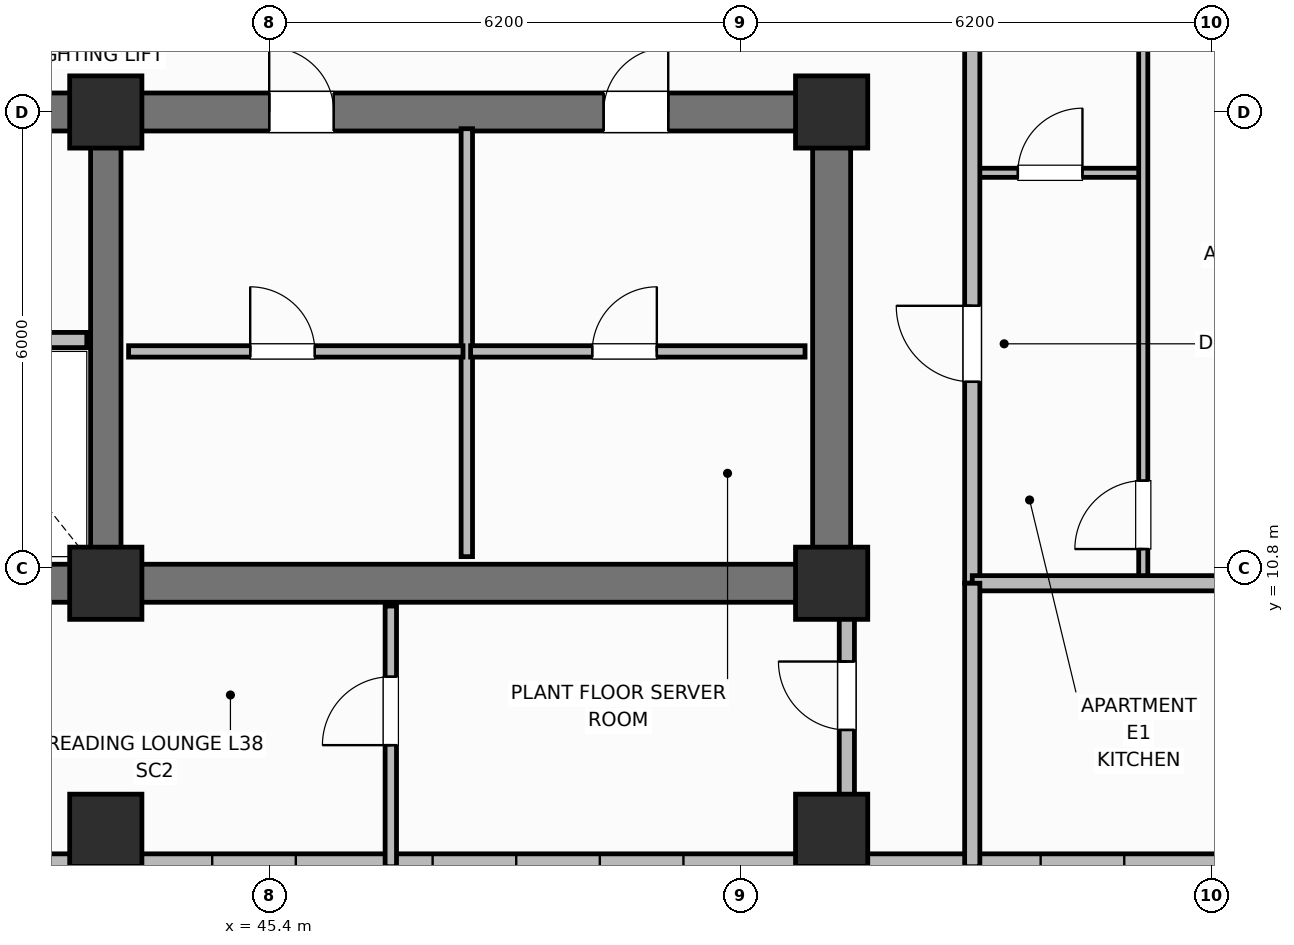
"""IFC4 building model, lengths in metres.
Left out: names, types, materials, properties, quantities, classifications, styles, units other than length and angle.
Written with IfcOpenShell. Run it as: python <this file> out.ifc"""

import sys

from ifc_helpers import new_model, si_unit, direction, frame, frame_2d, origin, origin_2d, place, context, subcontext, project, spatial, rectangle, extrude, element, fill, save


model = new_model("IFC4")
c1 = context("Model", 3, precision=1e-05, world=origin(), true_north=direction((0.0, 1.0)))
c2 = subcontext(c1, "Body", "Model", "MODEL_VIEW")
j1 = project(units=[si_unit("LENGTHUNIT", "METRE"), si_unit("PLANEANGLEUNIT", "RADIAN")], contexts=[c1])
p1 = place(None, origin())
s1 = spatial("IfcSite", under=j1, at=p1, CompositionType="ELEMENT")
p2 = place(p1, origin())
s2 = spatial("IfcBuilding", under=s1, at=p2, CompositionType="ELEMENT")
p3 = place(p2, frame((0.0, 0.0, 155.2)))
s3 = spatial("IfcBuildingStorey", under=s2, at=p3, CompositionType="ELEMENT", Elevation=155.2)
p4 = place(p3, frame((52.8, 10.6, 0.0), z_axis=(0.0, 0.0, 1.0), x_axis=(-1.0, 0.0, 0.0)))
e1 = element("IfcWall", 1, at=p4, inside=s3, PredefinedType="SHEAR", context=c2, shape_type="SweptSolid", body=[
    extrude(rectangle(XDim=27.2, YDim=0.5, at=frame_2d((13.6, 0.0))), origin(), (0.0, 0.0, 1.0), 3.7),
])
p5 = place(p3, frame((52.8, 10.85, 0.0), z_axis=(0.0, 0.0, 1.0), x_axis=(0.0, 1.0, 0.0)))
e2 = element("IfcWall", 2, at=p5, inside=s3, PredefinedType="SHEAR", context=c2, shape_type="SweptSolid", body=[
    extrude(rectangle(XDim=5.7, YDim=0.5, at=frame_2d((2.85, 0.0))), origin(), (0.0, 0.0, 1.0), 3.7),
])
p6 = place(p3, frame((25.6, 16.8, 0.0), z_axis=(0.0, 0.0, 1.0), x_axis=(1.0, 0.0, 0.0)))
e3 = element("IfcWall", 3, at=p6, inside=s3, PredefinedType="SHEAR", context=c2, shape_type="SweptSolid", body=[
    extrude(rectangle(XDim=27.2, YDim=0.5, at=frame_2d((13.6, 0.0))), origin(), (0.0, 0.0, 1.0), 3.7),
])
p7 = place(p6, frame((1.7, 0.0, 0.0)))
e4 = element("IfcOpeningElement", 4, at=p7, cuts=e3, PredefinedType="OPENING", context=c2, shape_type="SweptSolid", body=[
    extrude(rectangle(XDim=1.1, YDim=2.15, at=frame_2d((0.55, 1.075))), frame((0.0, 0.26, 0.0), z_axis=(0.0, -1.0, 0.0), x_axis=(1.0, 0.0, 0.0)), (0.0, 0.0, 1.0), 0.52),
])
p8 = place(p6, frame((4.45, 0.0, 0.0)))
e5 = element("IfcOpeningElement", 5, at=p8, cuts=e3, PredefinedType="OPENING", context=c2, shape_type="SweptSolid", body=[
    extrude(rectangle(XDim=0.85, YDim=2.1, at=frame_2d((0.425, 1.05))), frame((0.0, 0.26, 0.0), z_axis=(0.0, -1.0, 0.0), x_axis=(1.0, 0.0, 0.0)), (0.0, 0.0, 1.0), 0.52),
])
p9 = place(p6, frame((6.5, 0.0, 0.0)))
e6 = element("IfcOpeningElement", 6, at=p9, cuts=e3, PredefinedType="OPENING", context=c2, shape_type="SweptSolid", body=[
    extrude(rectangle(XDim=0.85, YDim=2.1, at=frame_2d((0.425, 1.05))), frame((0.0, 0.26, 0.0), z_axis=(0.0, -1.0, 0.0), x_axis=(1.0, 0.0, 0.0)), (0.0, 0.0, 1.0), 0.52),
])
p10 = place(p6, frame((13.0, 0.0, 0.0)))
e7 = element("IfcOpeningElement", 7, at=p10, cuts=e3, PredefinedType="OPENING", context=c2, shape_type="SweptSolid", body=[
    extrude(rectangle(XDim=1.2, YDim=2.15, at=frame_2d((0.6, 1.075))), frame((0.0, 0.26, 0.0), z_axis=(0.0, -1.0, 0.0), x_axis=(1.0, 0.0, 0.0)), (0.0, 0.0, 1.0), 0.52),
])
p11 = place(p6, frame((19.8, 0.0, 0.0)))
e8 = element("IfcOpeningElement", 8, at=p11, cuts=e3, PredefinedType="OPENING", context=c2, shape_type="SweptSolid", body=[
    extrude(rectangle(XDim=0.85, YDim=2.1, at=frame_2d((0.425, 1.05))), frame((0.0, 0.26, 0.0), z_axis=(0.0, -1.0, 0.0), x_axis=(1.0, 0.0, 0.0)), (0.0, 0.0, 1.0), 0.52),
])
p12 = place(p6, frame((24.2, 0.0, 0.0)))
e9 = element("IfcOpeningElement", 9, at=p12, cuts=e3, PredefinedType="OPENING", context=c2, shape_type="SweptSolid", body=[
    extrude(rectangle(XDim=0.85, YDim=2.1, at=frame_2d((0.425, 1.05))), frame((0.0, 0.26, 0.0), z_axis=(0.0, -1.0, 0.0), x_axis=(1.0, 0.0, 0.0)), (0.0, 0.0, 1.0), 0.52),
])
p13 = place(p3, frame((43.25, 10.85, 0.0), z_axis=(0.0, 0.0, 1.0), x_axis=(0.0, 1.0, 0.0)))
e10 = element("IfcWall", 10, at=p13, inside=s3, PredefinedType="SHEAR", context=c2, shape_type="SweptSolid", body=[
    extrude(rectangle(XDim=5.7, YDim=0.4, at=frame_2d((2.85, 0.0))), origin(), (0.0, 0.0, 1.0), 3.7),
])
for number, where, z_axis, x_axis in (
    (11, (43.25, 10.6, 0.0), (0.0, 0.0, 1.0), (1.0, 0.0, 0.0)),
    (12, (43.25, 16.8, 0.0), (0.0, 0.0, 1.0), (1.0, 0.0, 0.0)),
    (13, (52.8, 10.6, 0.0), (0.0, 0.0, 1.0), (1.0, 0.0, 0.0)),
    (14, (52.8, 16.8, 0.0), (0.0, 0.0, 1.0), (1.0, 0.0, 0.0)),
    (15, (43.25, 7.35, 0.0), (0.0, 0.0, 1.0), (1.0, 0.0, 0.0)),
    (16, (52.8, 7.35, 0.0), (0.0, 0.0, 1.0), (1.0, 0.0, 0.0)),
):
    element("IfcColumn", number, at=place(p3, frame(where, z_axis=z_axis, x_axis=x_axis)), inside=s3, PredefinedType="COLUMN", context=c2, shape_type="SweptSolid", body=[
        extrude(rectangle(XDim=0.95, YDim=0.95, at=origin_2d()), origin(), (0.0, 0.0, 1.0), 3.7),
    ])
p14 = place(p3, frame((42.4, 6.87, 0.0), z_axis=(0.0, 0.0, 1.0), x_axis=(1.0, 0.0, 0.0)))
e17 = element("IfcWall", 17, at=p14, inside=s3, PredefinedType="SOLIDWALL", context=c2, shape_type="SweptSolid", body=[
    extrude(rectangle(XDim=15.8, YDim=0.34, at=frame_2d((7.9, 0.0))), origin(), (0.0, 0.0, 1.0), 2.72),
])
p15 = place(p14, frame((2.25, 0.0, 0.95)))
e18 = element("IfcOpeningElement", 18, at=p15, cuts=e17, PredefinedType="OPENING", context=c2, shape_type="SweptSolid", body=[
    extrude(rectangle(XDim=1.1, YDim=1.65, at=frame_2d((0.55, 0.825))), frame((0.0, 0.18, 0.0), z_axis=(0.0, -1.0, 0.0), x_axis=(1.0, 0.0, 0.0)), (0.0, 0.0, 1.0), 0.36),
])
p16 = place(p14, frame((5.15, 0.0, 0.95)))
e19 = element("IfcOpeningElement", 19, at=p16, cuts=e17, PredefinedType="OPENING", context=c2, shape_type="SweptSolid", body=[
    extrude(rectangle(XDim=1.1, YDim=1.65, at=frame_2d((0.55, 0.825))), frame((0.0, 0.18, 0.0), z_axis=(0.0, -1.0, 0.0), x_axis=(1.0, 0.0, 0.0)), (0.0, 0.0, 1.0), 0.36),
])
p17 = place(p14, frame((7.35, 0.0, 0.95)))
e20 = element("IfcOpeningElement", 20, at=p17, cuts=e17, PredefinedType="OPENING", context=c2, shape_type="SweptSolid", body=[
    extrude(rectangle(XDim=1.1, YDim=1.65, at=frame_2d((0.55, 0.825))), frame((0.0, 0.18, 0.0), z_axis=(0.0, -1.0, 0.0), x_axis=(1.0, 0.0, 0.0)), (0.0, 0.0, 1.0), 0.36),
])
p18 = place(p14, frame((13.15, 0.0, 0.95)))
e21 = element("IfcOpeningElement", 21, at=p18, cuts=e17, PredefinedType="OPENING", context=c2, shape_type="SweptSolid", body=[
    extrude(rectangle(XDim=1.1, YDim=1.65, at=frame_2d((0.55, 0.825))), frame((0.0, 0.18, 0.0), z_axis=(0.0, -1.0, 0.0), x_axis=(1.0, 0.0, 0.0)), (0.0, 0.0, 1.0), 0.36),
])
p19 = place(p3, frame((35.4, 13.8, 0.0), z_axis=(0.0, 0.0, 1.0), x_axis=(1.0, 0.0, 0.0)))
e22 = element("IfcWall", 22, at=p19, inside=s3, PredefinedType="PARTITIONING", context=c2, shape_type="SweptSolid", body=[
    extrude(rectangle(XDim=7.6, YDim=0.2, at=frame_2d((3.8, 0.0))), origin(), (0.0, 0.0, 1.0), 2.32),
])
p20 = place(p19, frame((0.7, 0.0, 0.0)))
e23 = element("IfcOpeningElement", 23, at=p20, cuts=e22, PredefinedType="OPENING", context=c2, shape_type="SweptSolid", body=[
    extrude(rectangle(XDim=1.1, YDim=2.15, at=frame_2d((0.55, 1.075))), frame((0.0, 0.11, 0.0), z_axis=(0.0, -1.0, 0.0), x_axis=(1.0, 0.0, 0.0)), (0.0, 0.0, 1.0), 0.22),
])
p21 = place(p19, frame((3.35, 0.0, 0.0)))
e24 = element("IfcOpeningElement", 24, at=p21, cuts=e22, PredefinedType="OPENING", context=c2, shape_type="SweptSolid", body=[
    extrude(rectangle(XDim=1.2, YDim=2.15, at=frame_2d((0.6, 1.075))), frame((0.0, 0.11, 0.0), z_axis=(0.0, -1.0, 0.0), x_axis=(1.0, 0.0, 0.0)), (0.0, 0.0, 1.0), 0.22),
])
p22 = place(p3, frame((48.0, 10.95, 0.0), z_axis=(0.0, 0.0, 1.0), x_axis=(0.0, 1.0, 0.0)))
e25 = element("IfcWall", 25, at=p22, inside=s3, PredefinedType="PARTITIONING", context=c2, shape_type="SweptSolid", body=[
    extrude(rectangle(XDim=5.63, YDim=0.15, at=frame_2d((2.815, 0.0))), origin(), (0.0, 0.0, 1.0), 2.55),
])
p23 = place(p3, frame((43.55, 13.65, 0.0), z_axis=(0.0, 0.0, 1.0), x_axis=(1.0, 0.0, 0.0)))
e26 = element("IfcWall", 26, at=p23, inside=s3, PredefinedType="PARTITIONING", context=c2, shape_type="SweptSolid", body=[
    extrude(rectangle(XDim=4.4, YDim=0.15, at=frame_2d((2.2, 0.0))), origin(), (0.0, 0.0, 1.0), 2.55),
])
p24 = place(p23, frame((1.6, 0.0, 0.0)))
e27 = element("IfcOpeningElement", 27, at=p24, cuts=e26, PredefinedType="OPENING", context=c2, shape_type="SweptSolid", body=[
    extrude(rectangle(XDim=0.85, YDim=2.1, at=frame_2d((0.425, 1.05))), frame((0.0, 0.085, 0.0), z_axis=(0.0, -1.0, 0.0), x_axis=(1.0, 0.0, 0.0)), (0.0, 0.0, 1.0), 0.17),
])
p25 = place(p3, frame((48.05, 13.65, 0.0), z_axis=(0.0, 0.0, 1.0), x_axis=(1.0, 0.0, 0.0)))
e28 = element("IfcWall", 28, at=p25, inside=s3, PredefinedType="PARTITIONING", context=c2, shape_type="SweptSolid", body=[
    extrude(rectangle(XDim=4.4, YDim=0.15, at=frame_2d((2.2, 0.0))), origin(), (0.0, 0.0, 1.0), 2.55),
])
p26 = place(p25, frame((1.6, 0.0, 0.0)))
e29 = element("IfcOpeningElement", 29, at=p26, cuts=e28, PredefinedType="OPENING", context=c2, shape_type="SweptSolid", body=[
    extrude(rectangle(XDim=0.85, YDim=2.1, at=frame_2d((0.425, 1.05))), frame((0.0, 0.085, 0.0), z_axis=(0.0, -1.0, 0.0), x_axis=(1.0, 0.0, 0.0)), (0.0, 0.0, 1.0), 0.17),
])
p27 = place(p3, frame((54.65, 16.0, 0.0), z_axis=(0.0, 0.0, 1.0), x_axis=(1.0, 0.0, 0.0)))
e30 = element("IfcWall", 30, at=p27, inside=s3, PredefinedType="PARTITIONING", context=c2, shape_type="SweptSolid", body=[
    extrude(rectangle(XDim=2.25, YDim=0.12, at=frame_2d((1.125, 0.0))), origin(), (0.0, 0.0, 1.0), 2.55),
])
p28 = place(p27, frame((0.6, 0.0, 0.0)))
e31 = element("IfcOpeningElement", 31, at=p28, cuts=e30, PredefinedType="OPENING", context=c2, shape_type="SweptSolid", body=[
    extrude(rectangle(XDim=0.85, YDim=2.1, at=frame_2d((0.425, 1.05))), frame((0.0, 0.07, 0.0), z_axis=(0.0, -1.0, 0.0), x_axis=(1.0, 0.0, 0.0)), (0.0, 0.0, 1.0), 0.14),
])
p29 = place(p3, frame((56.9, 10.64, 0.0), z_axis=(0.0, 0.0, 1.0), x_axis=(0.0, 1.0, 0.0)))
e32 = element("IfcWall", 32, at=p29, inside=s3, PredefinedType="PARTITIONING", context=c2, shape_type="SweptSolid", body=[
    extrude(rectangle(XDim=19.12, YDim=0.12, at=frame_2d((9.56, 0.0))), origin(), (0.0, 0.0, 1.0), 2.55),
])
p30 = place(p29, frame((0.41, 0.0, 0.0)))
e33 = element("IfcOpeningElement", 33, at=p30, cuts=e32, PredefinedType="OPENING", context=c2, shape_type="SweptSolid", body=[
    extrude(rectangle(XDim=0.9, YDim=2.1, at=frame_2d((0.45, 1.05))), frame((0.0, 0.07, 0.0), z_axis=(0.0, -1.0, 0.0), x_axis=(1.0, 0.0, 0.0)), (0.0, 0.0, 1.0), 0.14),
])
p31 = place(p29, frame((13.735, 0.0, 0.0)))
e34 = element("IfcOpeningElement", 34, at=p31, cuts=e32, PredefinedType="OPENING", context=c2, shape_type="SweptSolid", body=[
    extrude(rectangle(XDim=0.82, YDim=2.08, at=frame_2d((0.41, 1.04))), frame((0.0, 0.07, 0.0), z_axis=(0.0, -1.0, 0.0), x_axis=(1.0, 0.0, 0.0)), (0.0, 0.0, 1.0), 0.14),
])
p32 = place(p3, frame((54.65, 10.6, 0.0), z_axis=(0.0, 0.0, 1.0), x_axis=(0.0, 1.0, 0.0)))
e35 = element("IfcWall", 35, at=p32, inside=s3, PredefinedType="PARTITIONING", context=c2, shape_type="SweptSolid", body=[
    extrude(rectangle(XDim=35.2, YDim=0.2, at=frame_2d((17.6, 0.0))), origin(), (0.0, 0.0, 1.0), 2.55),
])
p33 = place(p32, frame((2.65, 0.0, 0.0)))
e36 = element("IfcOpeningElement", 36, at=p33, cuts=e35, PredefinedType="OPENING", context=c2, shape_type="SweptSolid", body=[
    extrude(rectangle(XDim=1.0, YDim=2.15, at=frame_2d((0.5, 1.075))), frame((0.0, 0.11, 0.0), z_axis=(0.0, -1.0, 0.0), x_axis=(1.0, 0.0, 0.0)), (0.0, 0.0, 1.0), 0.22),
])
p34 = place(p32, frame((22.75, 0.0, 0.0)))
e37 = element("IfcOpeningElement", 37, at=p34, cuts=e35, PredefinedType="OPENING", context=c2, shape_type="SweptSolid", body=[
    extrude(rectangle(XDim=1.0, YDim=2.15, at=frame_2d((0.5, 1.075))), frame((0.0, 0.11, 0.0), z_axis=(0.0, -1.0, 0.0), x_axis=(1.0, 0.0, 0.0)), (0.0, 0.0, 1.0), 0.22),
])
p35 = place(p3, frame((54.65, 10.6, 0.0), z_axis=(0.0, 0.0, 1.0), x_axis=(1.0, 0.0, 0.0)))
e38 = element("IfcWall", 38, at=p35, inside=s3, PredefinedType="PARTITIONING", context=c2, shape_type="SweptSolid", body=[
    extrude(rectangle(XDim=6.76, YDim=0.2, at=frame_2d((3.38, 0.0))), origin(), (0.0, 0.0, 1.0), 2.55),
])
p36 = place(p3, frame((54.65, 6.87, 0.0), z_axis=(0.0, 0.0, 1.0), x_axis=(0.0, 1.0, 0.0)))
e39 = element("IfcWall", 39, at=p36, inside=s3, PredefinedType="PARTITIONING", context=c2, shape_type="SweptSolid", body=[
    extrude(rectangle(XDim=3.73, YDim=0.2, at=frame_2d((1.865, 0.0))), origin(), (0.0, 0.0, 1.0), 2.55),
])
p37 = place(p3, frame((47.0, 6.87, 0.0), z_axis=(0.0, 0.0, 1.0), x_axis=(0.0, 1.0, 0.0)))
e40 = element("IfcWall", 40, at=p37, inside=s3, PredefinedType="PARTITIONING", context=c2, shape_type="SweptSolid", body=[
    extrude(rectangle(XDim=3.43, YDim=0.15, at=frame_2d((1.715, 0.0))), origin(), (0.0, 0.0, 1.0), 2.55),
])
p38 = place(p37, frame((1.6, 0.0, 0.0)))
e41 = element("IfcOpeningElement", 41, at=p38, cuts=e40, PredefinedType="OPENING", context=c2, shape_type="SweptSolid", body=[
    extrude(rectangle(XDim=0.9, YDim=2.1, at=frame_2d((0.45, 1.05))), frame((0.0, 0.085, 0.0), z_axis=(0.0, -1.0, 0.0), x_axis=(1.0, 0.0, 0.0)), (0.0, 0.0, 1.0), 0.17),
])
p39 = place(p3, frame((53.0, 7.82, 0.0), z_axis=(0.0, 0.0, 1.0), x_axis=(0.0, 1.0, 0.0)))
e42 = element("IfcWall", 42, at=p39, inside=s3, PredefinedType="PARTITIONING", context=c2, shape_type="SweptSolid", body=[
    extrude(rectangle(XDim=2.48, YDim=0.2, at=frame_2d((1.24, 0.0))), origin(), (0.0, 0.0, 1.0), 2.55),
])
p40 = place(p39, frame((0.85, 0.0, 0.0)))
e43 = element("IfcOpeningElement", 43, at=p40, cuts=e42, PredefinedType="OPENING", context=c2, shape_type="SweptSolid", body=[
    extrude(rectangle(XDim=0.9, YDim=2.1, at=frame_2d((0.45, 1.05))), frame((0.0, 0.11, 0.0), z_axis=(0.0, -1.0, 0.0), x_axis=(1.0, 0.0, 0.0)), (0.0, 0.0, 1.0), 0.22),
])
p41 = place(p15, origin())
e44 = element("IfcWindow", 44, at=p41, inside=s3, PartitioningType="SINGLE_PANEL", PredefinedType="WINDOW", context=c2, shape_type="SweptSolid", body=[
    extrude(rectangle(XDim=1.1, YDim=1.65, at=frame_2d((0.55, 0.825))), frame((0.0, 0.03, 0.0), z_axis=(0.0, -1.0, 0.0), x_axis=(1.0, 0.0, 0.0)), (0.0, 0.0, 1.0), 0.06),
])
fill(e18, e44)
p42 = place(p16, origin())
e45 = element("IfcWindow", 45, at=p42, inside=s3, PartitioningType="SINGLE_PANEL", PredefinedType="WINDOW", context=c2, shape_type="SweptSolid", body=[
    extrude(rectangle(XDim=1.1, YDim=1.65, at=frame_2d((0.55, 0.825))), frame((0.0, 0.03, 0.0), z_axis=(0.0, -1.0, 0.0), x_axis=(1.0, 0.0, 0.0)), (0.0, 0.0, 1.0), 0.06),
])
fill(e19, e45)
p43 = place(p17, origin())
e46 = element("IfcWindow", 46, at=p43, inside=s3, PartitioningType="SINGLE_PANEL", PredefinedType="WINDOW", context=c2, shape_type="SweptSolid", body=[
    extrude(rectangle(XDim=1.1, YDim=1.65, at=frame_2d((0.55, 0.825))), frame((0.0, 0.03, 0.0), z_axis=(0.0, -1.0, 0.0), x_axis=(1.0, 0.0, 0.0)), (0.0, 0.0, 1.0), 0.06),
])
fill(e20, e46)
p44 = place(p18, origin())
e47 = element("IfcWindow", 47, at=p44, inside=s3, PartitioningType="SINGLE_PANEL", PredefinedType="WINDOW", context=c2, shape_type="SweptSolid", body=[
    extrude(rectangle(XDim=1.1, YDim=1.65, at=frame_2d((0.55, 0.825))), frame((0.0, 0.03, 0.0), z_axis=(0.0, -1.0, 0.0), x_axis=(1.0, 0.0, 0.0)), (0.0, 0.0, 1.0), 0.06),
])
fill(e21, e47)
p45 = place(p24, origin())
e48 = element("IfcDoor", 48, at=p45, inside=s3, OperationType="SINGLE_SWING_LEFT", PredefinedType="DOOR", context=c2, shape_type="SweptSolid", body=[
    extrude(rectangle(XDim=0.85, YDim=2.1, at=frame_2d((0.425, 1.05))), frame((0.0, 0.025, 0.0), z_axis=(0.0, -1.0, 0.0), x_axis=(1.0, 0.0, 0.0)), (0.0, 0.0, 1.0), 0.05),
])
fill(e27, e48)
p46 = place(p26, origin())
e49 = element("IfcDoor", 49, at=p46, inside=s3, OperationType="SINGLE_SWING_RIGHT", PredefinedType="DOOR", context=c2, shape_type="SweptSolid", body=[
    extrude(rectangle(XDim=0.85, YDim=2.1, at=frame_2d((0.425, 1.05))), frame((0.0, 0.025, 0.0), z_axis=(0.0, -1.0, 0.0), x_axis=(1.0, 0.0, 0.0)), (0.0, 0.0, 1.0), 0.05),
])
fill(e29, e49)
p47 = place(p28, origin())
e50 = element("IfcDoor", 50, at=p47, inside=s3, OperationType="SINGLE_SWING_RIGHT", PredefinedType="DOOR", context=c2, shape_type="SweptSolid", body=[
    extrude(rectangle(XDim=0.85, YDim=2.1, at=frame_2d((0.425, 1.05))), frame((0.0, 0.025, 0.0), z_axis=(0.0, -1.0, 0.0), x_axis=(1.0, 0.0, 0.0)), (0.0, 0.0, 1.0), 0.05),
])
fill(e31, e50)
p48 = place(p30, origin())
e51 = element("IfcDoor", 51, at=p48, inside=s3, OperationType="SINGLE_SWING_LEFT", PredefinedType="DOOR", context=c2, shape_type="SweptSolid", body=[
    extrude(rectangle(XDim=0.9, YDim=2.1, at=frame_2d((0.45, 1.05))), frame((0.0, 0.025, 0.0), z_axis=(0.0, -1.0, 0.0), x_axis=(1.0, 0.0, 0.0)), (0.0, 0.0, 1.0), 0.05),
])
fill(e33, e51)
p49 = place(p33, origin())
e52 = element("IfcDoor", 52, at=p49, inside=s3, OperationType="SINGLE_SWING_RIGHT", PredefinedType="DOOR", context=c2, shape_type="SweptSolid", body=[
    extrude(rectangle(XDim=1.0, YDim=2.15, at=frame_2d((0.5, 1.075))), frame((0.0, 0.025, 0.0), z_axis=(0.0, -1.0, 0.0), x_axis=(1.0, 0.0, 0.0)), (0.0, 0.0, 1.0), 0.05),
])
fill(e36, e52)
p50 = place(p38, origin())
e53 = element("IfcDoor", 53, at=p50, inside=s3, OperationType="SINGLE_SWING_LEFT", PredefinedType="DOOR", context=c2, shape_type="SweptSolid", body=[
    extrude(rectangle(XDim=0.9, YDim=2.1, at=frame_2d((0.45, 1.05))), frame((0.0, 0.025, 0.0), z_axis=(0.0, -1.0, 0.0), x_axis=(1.0, 0.0, 0.0)), (0.0, 0.0, 1.0), 0.05),
])
fill(e41, e53)
p51 = place(p40, origin())
e54 = element("IfcDoor", 54, at=p51, inside=s3, OperationType="SINGLE_SWING_RIGHT", PredefinedType="DOOR", context=c2, shape_type="SweptSolid", body=[
    extrude(rectangle(XDim=0.9, YDim=2.1, at=frame_2d((0.45, 1.05))), frame((0.0, 0.025, 0.0), z_axis=(0.0, -1.0, 0.0), x_axis=(1.0, 0.0, 0.0)), (0.0, 0.0, 1.0), 0.05),
])
fill(e43, e54)
p52 = place(p11, origin())
e55 = element("IfcDoor", 55, at=p52, inside=s3, OperationType="SINGLE_SWING_LEFT", PredefinedType="DOOR", context=c2, shape_type="SweptSolid", body=[
    extrude(rectangle(XDim=0.85, YDim=2.1, at=frame_2d((0.425, 1.05))), frame((0.0, 0.025, 0.0), z_axis=(0.0, -1.0, 0.0), x_axis=(1.0, 0.0, 0.0)), (0.0, 0.0, 1.0), 0.05),
])
fill(e8, e55)
p53 = place(p12, origin())
e56 = element("IfcDoor", 56, at=p53, inside=s3, OperationType="SINGLE_SWING_RIGHT", PredefinedType="DOOR", context=c2, shape_type="SweptSolid", body=[
    extrude(rectangle(XDim=0.85, YDim=2.1, at=frame_2d((0.425, 1.05))), frame((0.0, 0.025, 0.0), z_axis=(0.0, -1.0, 0.0), x_axis=(1.0, 0.0, 0.0)), (0.0, 0.0, 1.0), 0.05),
])
fill(e9, e56)
save(model, sys.argv[1])
